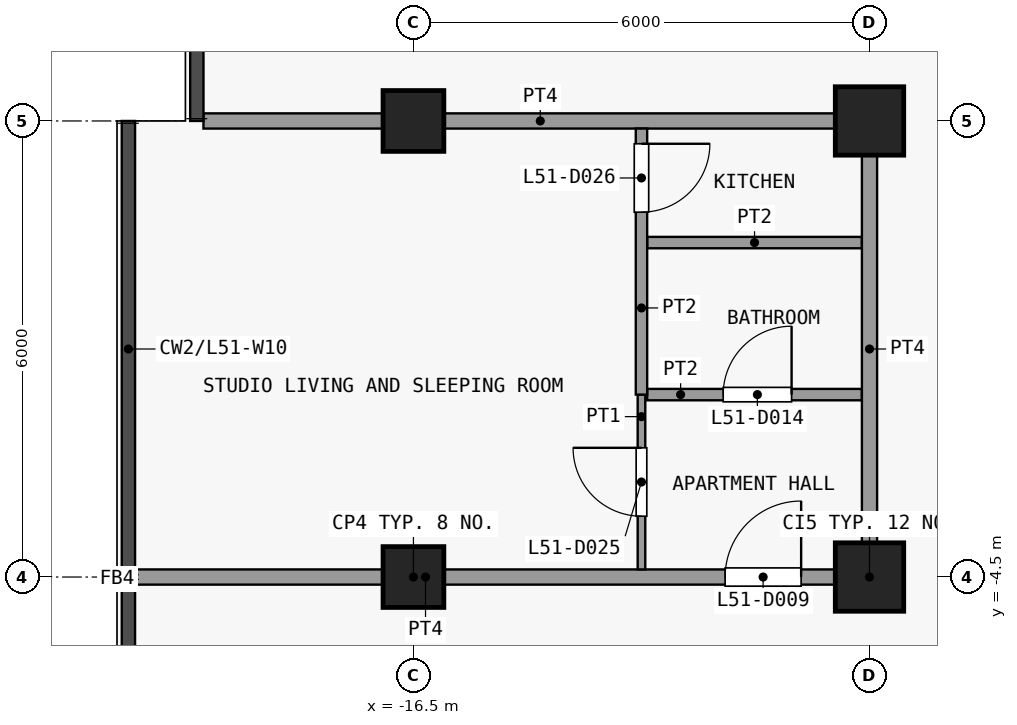
"""IFC4 building model, lengths in metres.
Left out: names, types, materials, properties, quantities, classifications, styles, units other than length and angle.
Written with IfcOpenShell. Run it as: python <this file> out.ifc"""

import sys

from ifc_helpers import new_model, si_unit, direction, frame, frame_2d, origin, origin_2d, place, context, subcontext, project, spatial, rectangle, extrude, element, fill, save


model = new_model("IFC4")
c1 = context("Model", 3, precision=1e-05, world=origin(), true_north=direction((0.0, 1.0)))
c2 = subcontext(c1, "Body", "Model", "MODEL_VIEW")
j1 = project(units=[si_unit("LENGTHUNIT", "METRE"), si_unit("PLANEANGLEUNIT", "RADIAN")], contexts=[c1])
p1 = place(None, origin())
s1 = spatial("IfcSite", under=j1, at=p1, CompositionType="ELEMENT")
p2 = place(p1, origin())
s2 = spatial("IfcBuilding", under=s1, at=p2, CompositionType="ELEMENT")
p3 = place(p2, frame((0.0, 0.0, 205.1)))
s3 = spatial("IfcBuildingStorey", under=s2, at=p3, CompositionType="ELEMENT", Elevation=205.1)
for number, where, z_axis, x_axis in (
    (1, (-16.5, -4.5, 0.0), (0.0, 0.0, 1.0), (1.0, 0.0, 0.0)),
    (2, (-16.5, 1.5, 0.0), (0.0, 0.0, 1.0), (1.0, 0.0, 0.0)),
):
    element("IfcColumn", number, at=place(p3, frame(where, z_axis=z_axis, x_axis=x_axis)), inside=s3, PredefinedType="COLUMN", context=c2, shape_type="SweptSolid", body=[
        extrude(rectangle(XDim=0.8, YDim=0.8, at=origin_2d()), origin(), (0.0, 0.0, 1.0), 3.6),
    ])
for number, where, z_axis, x_axis in (
    (3, (-10.5, -4.5, 0.0), (0.0, 0.0, 1.0), (1.0, 0.0, 0.0)),
    (4, (-10.5, 1.5, 0.0), (0.0, 0.0, 1.0), (1.0, 0.0, 0.0)),
):
    element("IfcColumn", number, at=place(p3, frame(where, z_axis=z_axis, x_axis=x_axis)), inside=s3, PredefinedType="COLUMN", context=c2, shape_type="SweptSolid", body=[
        extrude(rectangle(XDim=0.9, YDim=0.9, at=origin_2d()), origin(), (0.0, 0.0, 1.0), 3.6),
    ])
p4 = place(p3, frame((-20.163, -4.5, 0.0), z_axis=(0.0, 0.0, 1.0), x_axis=(1.0, 0.0, 0.0)))
e5 = element("IfcWall", 5, at=p4, inside=s3, PredefinedType="PARTITIONING", context=c2, shape_type="SweptSolid", body=[
    extrude(rectangle(XDim=9.763, YDim=0.2, at=frame_2d((4.881, 0.0))), origin(), (0.0, 0.0, 1.0), 3.3),
])
p5 = place(p4, frame((7.763, 0.0, 0.0)))
e6 = element("IfcOpeningElement", 6, at=p5, cuts=e5, PredefinedType="OPENING", context=c2, shape_type="SweptSolid", body=[
    extrude(rectangle(XDim=1.0, YDim=2.1, at=frame_2d((0.5, 1.05))), frame((0.0, 0.11, 0.0), z_axis=(0.0, -1.0, 0.0), x_axis=(1.0, 0.0, 0.0)), (0.0, 0.0, 1.0), 0.22),
])
p6 = place(p3, frame((-13.425, -2.1, 0.0), z_axis=(0.0, 0.0, 1.0), x_axis=(1.0, 0.0, 0.0)))
e7 = element("IfcWall", 7, at=p6, inside=s3, PredefinedType="PARTITIONING", context=c2, shape_type="SweptSolid", body=[
    extrude(rectangle(XDim=2.825, YDim=0.15, at=frame_2d((1.413, 0.0))), origin(), (0.0, 0.0, 1.0), 3.3),
])
p7 = place(p6, frame((1.0, 0.0, 0.0)))
e8 = element("IfcOpeningElement", 8, at=p7, cuts=e7, PredefinedType="OPENING", context=c2, shape_type="SweptSolid", body=[
    extrude(rectangle(XDim=0.9, YDim=2.1, at=frame_2d((0.45, 1.05))), frame((0.0, 0.085, 0.0), z_axis=(0.0, -1.0, 0.0), x_axis=(1.0, 0.0, 0.0)), (0.0, 0.0, 1.0), 0.17),
])
p8 = place(p3, frame((-13.425, -0.1, 0.0), z_axis=(0.0, 0.0, 1.0), x_axis=(1.0, 0.0, 0.0)))
e9 = element("IfcWall", 9, at=p8, inside=s3, PredefinedType="PARTITIONING", context=c2, shape_type="SweptSolid", body=[
    extrude(rectangle(XDim=2.825, YDim=0.15, at=frame_2d((1.413, 0.0))), origin(), (0.0, 0.0, 1.0), 3.3),
])
p9 = place(p3, frame((-19.262, 1.5, 0.0), z_axis=(0.0, 0.0, 1.0), x_axis=(1.0, 0.0, 0.0)))
e10 = element("IfcWall", 10, at=p9, inside=s3, PredefinedType="PARTITIONING", context=c2, shape_type="SweptSolid", body=[
    extrude(rectangle(XDim=8.863, YDim=0.2, at=frame_2d((4.431, 0.0))), origin(), (0.0, 0.0, 1.0), 3.3),
])
p10 = place(p3, frame((-13.5, -4.4, 0.0), z_axis=(0.0, 0.0, 1.0), x_axis=(0.0, 1.0, 0.0)))
e11 = element("IfcWall", 11, at=p10, inside=s3, PredefinedType="PARTITIONING", context=c2, shape_type="SweptSolid", body=[
    extrude(rectangle(XDim=2.3, YDim=0.1, at=frame_2d((1.15, 0.0))), origin(), (0.0, 0.0, 1.0), 3.3),
])
p11 = place(p10, frame((0.7, 0.0, 0.0)))
e12 = element("IfcOpeningElement", 12, at=p11, cuts=e11, PredefinedType="OPENING", context=c2, shape_type="SweptSolid", body=[
    extrude(rectangle(XDim=0.9, YDim=2.1, at=frame_2d((0.45, 1.05))), frame((0.0, 0.06, 0.0), z_axis=(0.0, -1.0, 0.0), x_axis=(1.0, 0.0, 0.0)), (0.0, 0.0, 1.0), 0.12),
])
p12 = place(p3, frame((-13.5, -2.1, 0.0), z_axis=(0.0, 0.0, 1.0), x_axis=(0.0, 1.0, 0.0)))
e13 = element("IfcWall", 13, at=p12, inside=s3, PredefinedType="PARTITIONING", context=c2, shape_type="SweptSolid", body=[
    extrude(rectangle(XDim=3.5, YDim=0.15, at=frame_2d((1.75, 0.0))), origin(), (0.0, 0.0, 1.0), 3.3),
])
p13 = place(p12, frame((2.4, 0.0, 0.0)))
e14 = element("IfcOpeningElement", 14, at=p13, cuts=e13, PredefinedType="OPENING", context=c2, shape_type="SweptSolid", body=[
    extrude(rectangle(XDim=0.9, YDim=2.1, at=frame_2d((0.45, 1.05))), frame((0.0, 0.085, 0.0), z_axis=(0.0, -1.0, 0.0), x_axis=(1.0, 0.0, 0.0)), (0.0, 0.0, 1.0), 0.17),
])
p14 = place(p3, frame((-10.5, -4.4, 0.0), z_axis=(0.0, 0.0, 1.0), x_axis=(0.0, 1.0, 0.0)))
e15 = element("IfcWall", 15, at=p14, inside=s3, PredefinedType="PARTITIONING", context=c2, shape_type="SweptSolid", body=[
    extrude(rectangle(XDim=5.8, YDim=0.2, at=frame_2d((2.9, 0.0))), origin(), (0.0, 0.0, 1.0), 3.3),
])
p15 = place(p5, origin())
e16 = element("IfcDoor", 16, at=p15, inside=s3, OperationType="SINGLE_SWING_LEFT", PredefinedType="DOOR", context=c2, shape_type="SweptSolid", body=[
    extrude(rectangle(XDim=1.0, YDim=2.1, at=frame_2d((0.5, 1.05))), frame((0.0, 0.025, 0.0), z_axis=(0.0, -1.0, 0.0), x_axis=(1.0, 0.0, 0.0)), (0.0, 0.0, 1.0), 0.05),
])
fill(e6, e16)
p16 = place(p7, origin())
e17 = element("IfcDoor", 17, at=p16, inside=s3, OperationType="SINGLE_SWING_LEFT", PredefinedType="DOOR", context=c2, shape_type="SweptSolid", body=[
    extrude(rectangle(XDim=0.9, YDim=2.1, at=frame_2d((0.45, 1.05))), frame((0.0, 0.025, 0.0), z_axis=(0.0, -1.0, 0.0), x_axis=(1.0, 0.0, 0.0)), (0.0, 0.0, 1.0), 0.05),
])
fill(e8, e17)
p17 = place(p11, origin())
e18 = element("IfcDoor", 18, at=p17, inside=s3, OperationType="SINGLE_SWING_LEFT", PredefinedType="DOOR", context=c2, shape_type="SweptSolid", body=[
    extrude(rectangle(XDim=0.9, YDim=2.1, at=frame_2d((0.45, 1.05))), frame((0.0, 0.025, 0.0), z_axis=(0.0, -1.0, 0.0), x_axis=(1.0, 0.0, 0.0)), (0.0, 0.0, 1.0), 0.05),
])
fill(e12, e18)
p18 = place(p13, origin())
e19 = element("IfcDoor", 19, at=p18, inside=s3, OperationType="SINGLE_SWING_RIGHT", PredefinedType="DOOR", context=c2, shape_type="SweptSolid", body=[
    extrude(rectangle(XDim=0.9, YDim=2.1, at=frame_2d((0.45, 1.05))), frame((0.0, 0.025, 0.0), z_axis=(0.0, -1.0, 0.0), x_axis=(1.0, 0.0, 0.0)), (0.0, 0.0, 1.0), 0.05),
])
fill(e14, e19)
save(model, sys.argv[1])
